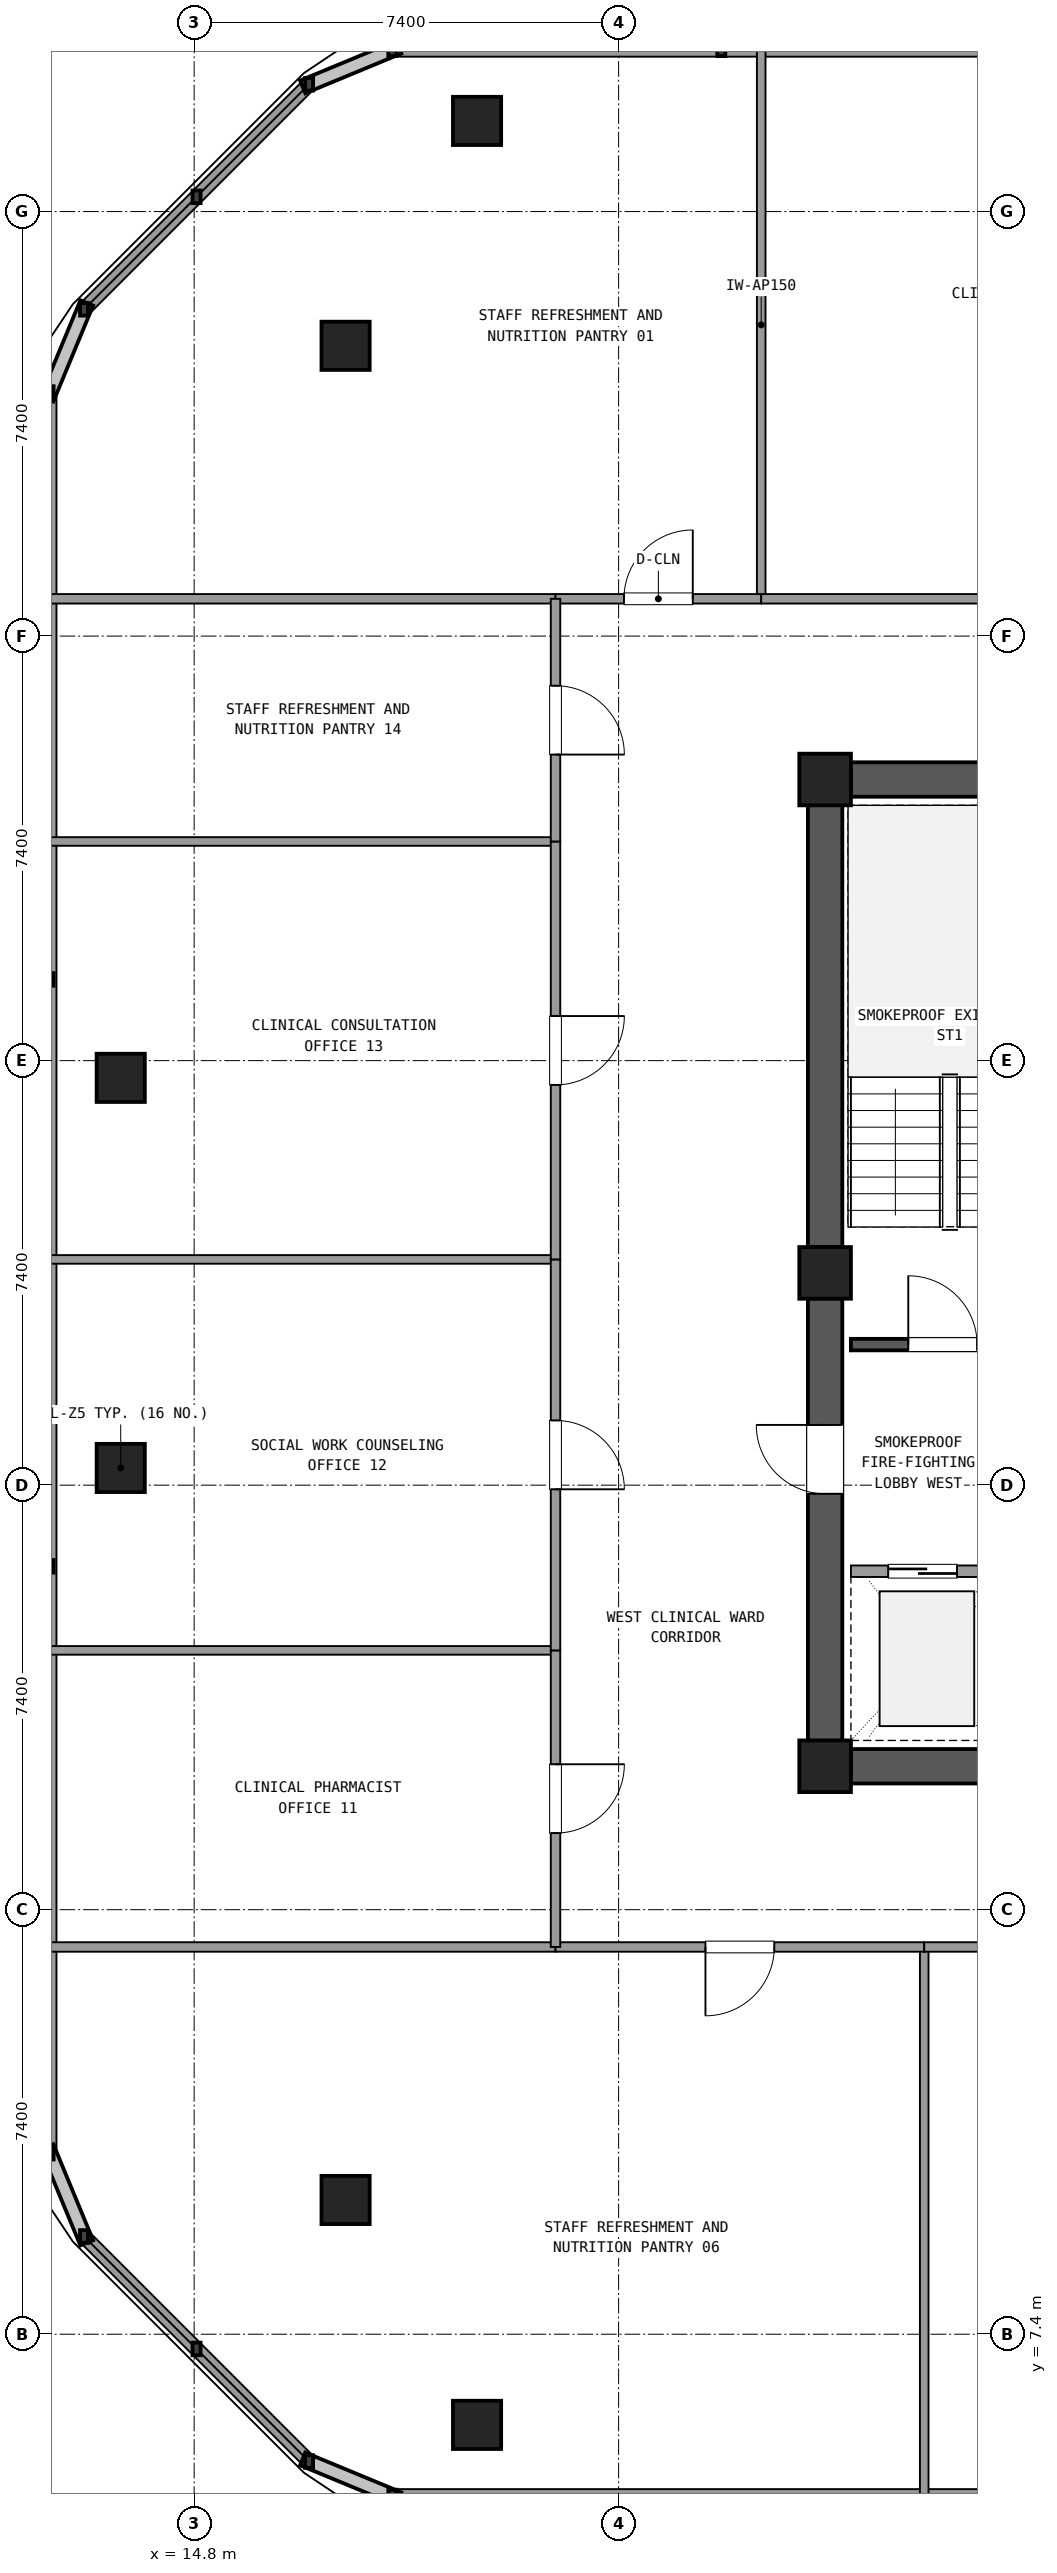
"""IFC4 building model, lengths in metres.
Left out: names, types, materials, properties, quantities, classifications, styles, units other than length and angle.
Written with IfcOpenShell. Run it as: python <this file> out.ifc"""

import sys

from ifc_helpers import new_model, si_unit, direction, frame, frame_2d, origin, origin_2d, place, context, subcontext, project, spatial, rectangle, extrude, element, fill, save


model = new_model("IFC4")
c1 = context("Model", 3, precision=1e-05, world=origin(), true_north=direction((0.0, 1.0)))
c2 = subcontext(c1, "Body", "Model", "MODEL_VIEW")
j1 = project(units=[si_unit("LENGTHUNIT", "METRE"), si_unit("PLANEANGLEUNIT", "RADIAN")], contexts=[c1])
p1 = place(None, origin())
s1 = spatial("IfcSite", under=j1, at=p1, CompositionType="ELEMENT")
p2 = place(p1, origin())
s2 = spatial("IfcBuilding", under=s1, at=p2, CompositionType="ELEMENT")
p3 = place(p2, frame((0.0, 0.0, 246.42)))
s3 = spatial("IfcBuildingStorey", under=s2, at=p3, CompositionType="ELEMENT", Elevation=246.42)
for number, where, z_axis, x_axis in (
    (1, (25.8, 17.3, 0.0), (0.0, 0.0, 1.0), (1.0, 0.0, 0.0)),
    (2, (25.8, 34.5, 0.0), (0.0, 0.0, 1.0), (1.0, 0.0, 0.0)),
    (3, (25.8, 25.9, 0.0), (0.0, 0.0, 1.0), (1.0, 0.0, 0.0)),
):
    element("IfcColumn", number, at=place(p3, frame(where, z_axis=z_axis, x_axis=x_axis)), inside=s3, PredefinedType="COLUMN", context=c2, shape_type="SweptSolid", body=[
        extrude(rectangle(XDim=0.9, YDim=0.9, at=origin_2d()), origin(), (0.0, 0.0, 1.0), 3.6),
    ])
p4 = place(p3, frame((26.245, 17.3, 0.0), z_axis=(0.0, 0.0, 1.0), x_axis=(1.0, 0.0, 0.0)))
e4 = element("IfcWall", 4, at=p4, inside=s3, PredefinedType="SHEAR", context=c2, shape_type="SweptSolid", body=[
    extrude(rectangle(XDim=10.31, YDim=0.6, at=frame_2d((5.155, 0.0))), origin(), (0.0, 0.0, 1.0), 3.32),
])
p5 = place(p3, frame((36.555, 34.5, 0.0), z_axis=(0.0, 0.0, 1.0), x_axis=(-1.0, 0.0, 0.0)))
e5 = element("IfcWall", 5, at=p5, inside=s3, PredefinedType="SHEAR", context=c2, shape_type="SweptSolid", body=[
    extrude(rectangle(XDim=10.31, YDim=0.6, at=frame_2d((5.155, 0.0))), origin(), (0.0, 0.0, 1.0), 3.32),
])
p6 = place(p5, frame((4.155, 0.0, 0.0)))
e6 = element("IfcOpeningElement", 6, at=p6, cuts=e5, PredefinedType="OPENING", context=c2, shape_type="SweptSolid", body=[
    extrude(rectangle(XDim=1.2, YDim=2.15, at=frame_2d((0.6, 1.075))), frame((0.0, 0.31, 0.0), z_axis=(0.0, -1.0, 0.0), x_axis=(1.0, 0.0, 0.0)), (0.0, 0.0, 1.0), 0.62),
])
p7 = place(p3, frame((25.8, 34.055, 0.0), z_axis=(0.0, 0.0, 1.0), x_axis=(0.0, -1.0, 0.0)))
e7 = element("IfcWall", 7, at=p7, inside=s3, PredefinedType="SHEAR", context=c2, shape_type="SweptSolid", body=[
    extrude(rectangle(XDim=7.71, YDim=0.6, at=frame_2d((3.855, 0.0))), origin(), (0.0, 0.0, 1.0), 3.32),
])
p8 = place(p3, frame((25.8, 25.455, 0.0), z_axis=(0.0, 0.0, 1.0), x_axis=(0.0, -1.0, 0.0)))
e8 = element("IfcWall", 8, at=p8, inside=s3, PredefinedType="SHEAR", context=c2, shape_type="SweptSolid", body=[
    extrude(rectangle(XDim=7.71, YDim=0.6, at=frame_2d((3.855, 0.0))), origin(), (0.0, 0.0, 1.0), 3.32),
])
p9 = place(p8, frame((2.205, 0.0, 0.0)))
e9 = element("IfcOpeningElement", 9, at=p9, cuts=e8, PredefinedType="OPENING", context=c2, shape_type="SweptSolid", body=[
    extrude(rectangle(XDim=1.2, YDim=2.15, at=frame_2d((0.6, 1.075))), frame((0.0, 0.31, 0.0), z_axis=(0.0, -1.0, 0.0), x_axis=(1.0, 0.0, 0.0)), (0.0, 0.0, 1.0), 0.62),
])
for number, where, z_axis, x_axis in (
    (10, (13.52, 22.5, 0.0), (0.0, 0.0, 1.0), (1.0, 0.0, 0.0)),
    (11, (17.44, 9.74, 0.0), (0.0, 0.0, 1.0), (1.0, 0.0, 0.0)),
    (12, (19.732, 5.82, 0.0), (0.0, 0.0, 1.0), (1.0, 0.0, 0.0)),
    (13, (19.732, 45.98, 0.0), (0.0, 0.0, 1.0), (1.0, 0.0, 0.0)),
    (14, (17.44, 42.06, 0.0), (0.0, 0.0, 1.0), (1.0, 0.0, 0.0)),
    (15, (13.52, 29.3, 0.0), (0.0, 0.0, 1.0), (1.0, 0.0, 0.0)),
):
    element("IfcColumn", number, at=place(p3, frame(where, z_axis=z_axis, x_axis=x_axis)), inside=s3, PredefinedType="COLUMN", context=c2, shape_type="SweptSolid", body=[
        extrude(rectangle(XDim=0.84, YDim=0.84, at=origin_2d()), origin(), (0.0, 0.0, 1.0), 3.6),
    ])
p10 = place(p3, frame((18.255, 4.58, 0.0), z_axis=(0.0, 0.0, 1.0), x_axis=(1.0, 0.0, 0.0)))
e16 = element("IfcWall", 16, at=p10, inside=s3, PredefinedType="SOLIDWALL", context=c2, shape_type="SweptSolid", body=[
    extrude(rectangle(XDim=37.49, YDim=0.24, at=frame_2d((18.745, 0.0))), origin(), (0.0, 0.0, 1.0), 0.85),
])
p11 = place(p3, frame((35.461, 47.22, 0.0), z_axis=(0.0, 0.0, 1.0), x_axis=(-1.0, 0.0, 0.0)))
e17 = element("IfcWall", 17, at=p11, inside=s3, PredefinedType="SOLIDWALL", context=c2, shape_type="SweptSolid", body=[
    extrude(rectangle(XDim=17.206, YDim=0.24, at=frame_2d((8.603, 0.0))), origin(), (0.0, 0.0, 1.0), 0.85),
])
p12 = place(p3, frame((16.804, 46.619, 0.0), z_axis=(0.0, 0.0, 1.0), x_axis=(-0.707106781187, -0.707106781187, 0.0)))
e18 = element("IfcWall", 18, at=p12, inside=s3, PredefinedType="SOLIDWALL", context=c2, shape_type="SweptSolid", body=[
    extrude(rectangle(XDim=5.548, YDim=0.24, at=frame_2d((2.774, 0.0))), origin(), (0.0, 0.0, 1.0), 0.85),
])
p13 = place(p3, frame((12.28, 41.245, 0.0), z_axis=(0.0, 0.0, 1.0), x_axis=(0.0, -1.0, 0.0)))
e19 = element("IfcWall", 19, at=p13, inside=s3, PredefinedType="SOLIDWALL", context=c2, shape_type="SweptSolid", body=[
    extrude(rectangle(XDim=30.69, YDim=0.24, at=frame_2d((15.345, 0.0))), origin(), (0.0, 0.0, 1.0), 0.85),
])
p14 = place(p3, frame((12.881, 9.104, 0.0), z_axis=(0.0, 0.0, 1.0), x_axis=(0.707084777957, -0.707128783731, 0.0)))
e20 = element("IfcWall", 20, at=p14, inside=s3, PredefinedType="SOLIDWALL", context=c2, shape_type="SweptSolid", body=[
    extrude(rectangle(XDim=5.548, YDim=0.24, at=frame_2d((2.774, 0.0))), origin(), (0.0, 0.0, 1.0), 0.85),
])
p15 = place(p3, frame((26.25, 24.65, 0.0), z_axis=(0.0, 0.0, 1.0), x_axis=(1.0, 0.0, 0.0)))
e21 = element("IfcWall", 21, at=p15, inside=s3, PredefinedType="SHEAR", context=c2, shape_type="SweptSolid", body=[
    extrude(rectangle(XDim=4.0, YDim=0.2, at=frame_2d((2.0, 0.0))), origin(), (0.0, 0.0, 1.0), 3.32),
])
p16 = place(p15, frame((1.0, 0.0, 0.0)))
e22 = element("IfcOpeningElement", 22, at=p16, cuts=e21, PredefinedType="OPENING", context=c2, shape_type="SweptSolid", body=[
    extrude(rectangle(XDim=1.2, YDim=2.15, at=frame_2d((0.6, 1.075))), frame((0.0, 0.11, 0.0), z_axis=(0.0, -1.0, 0.0), x_axis=(1.0, 0.0, 0.0)), (0.0, 0.0, 1.0), 0.22),
])
p17 = place(p3, frame((26.25, 20.7, 0.0), z_axis=(0.0, 0.0, 1.0), x_axis=(1.0, 0.0, 0.0)))
e23 = element("IfcWall", 23, at=p17, inside=s3, PredefinedType="SOLIDWALL", context=c2, shape_type="SweptSolid", body=[
    extrude(rectangle(XDim=4.0, YDim=0.2, at=frame_2d((2.0, 0.0))), origin(), (0.0, 0.0, 1.0), 2.61),
])
p18 = place(p17, frame((0.65, 0.0, 0.0)))
e24 = element("IfcOpeningElement", 24, at=p18, cuts=e23, PredefinedType="OPENING", context=c2, shape_type="SweptSolid", body=[
    extrude(rectangle(XDim=1.2, YDim=2.15, at=frame_2d((0.6, 1.075))), frame((0.0, 0.11, 0.0), z_axis=(0.0, -1.0, 0.0), x_axis=(1.0, 0.0, 0.0)), (0.0, 0.0, 1.0), 0.22),
])
for number, where, z_axis, x_axis in (
    (25, (12.3, 37.65, 0.0), (0.0, 0.0, 1.0), (1.0, 0.0, 0.0)),
    (26, (12.3, 14.15, 0.0), (0.0, 0.0, 1.0), (1.0, 0.0, 0.0)),
):
    element("IfcWall", number, at=place(p3, frame(where, z_axis=z_axis, x_axis=x_axis)), inside=s3, PredefinedType="PARTITIONING", context=c2, shape_type="SweptSolid", body=[
        extrude(rectangle(XDim=8.8, YDim=0.165, at=frame_2d((4.4, 0.0))), origin(), (0.0, 0.0, 1.0), 2.61),
    ])
p19 = place(p3, frame((24.686, 37.65, 0.0), z_axis=(0.0, 0.0, 1.0), x_axis=(0.0, 1.0, 0.0)))
e27 = element("IfcWall", 27, at=p19, inside=s3, PredefinedType="PARTITIONING", context=c2, shape_type="SweptSolid", body=[
    extrude(rectangle(XDim=9.55, YDim=0.15, at=frame_2d((4.775, 0.0))), origin(), (0.0, 0.0, 1.0), 2.61),
])
p20 = place(p3, frame((21.1, 37.65, 0.0), z_axis=(0.0, 0.0, 1.0), x_axis=(1.0, 0.0, 0.0)))
e28 = element("IfcWall", 28, at=p20, inside=s3, PredefinedType="PARTITIONING", context=c2, shape_type="SweptSolid", body=[
    extrude(rectangle(XDim=3.586, YDim=0.165, at=frame_2d((1.793, 0.0))), origin(), (0.0, 0.0, 1.0), 2.61),
])
p21 = place(p20, frame((1.193, 0.0, 0.0)))
e29 = element("IfcOpeningElement", 29, at=p21, cuts=e28, PredefinedType="OPENING", context=c2, shape_type="SweptSolid", body=[
    extrude(rectangle(XDim=1.2, YDim=2.15, at=frame_2d((0.6, 1.075))), frame((0.0, 0.093, 0.0), z_axis=(0.0, -1.0, 0.0), x_axis=(1.0, 0.0, 0.0)), (0.0, 0.0, 1.0), 0.185),
])
p22 = place(p3, frame((24.686, 37.65, 0.0), z_axis=(0.0, 0.0, 1.0), x_axis=(1.0, 0.0, 0.0)))
e30 = element("IfcWall", 30, at=p22, inside=s3, PredefinedType="PARTITIONING", context=c2, shape_type="SweptSolid", body=[
    extrude(rectangle(XDim=8.999, YDim=0.165, at=frame_2d((4.5, 0.0))), origin(), (0.0, 0.0, 1.0), 2.61),
])
p23 = place(p22, frame((3.9, 0.0, 0.0)))
e31 = element("IfcOpeningElement", 31, at=p23, cuts=e30, PredefinedType="OPENING", context=c2, shape_type="SweptSolid", body=[
    extrude(rectangle(XDim=1.2, YDim=2.15, at=frame_2d((0.6, 1.075))), frame((0.0, 0.093, 0.0), z_axis=(0.0, -1.0, 0.0), x_axis=(1.0, 0.0, 0.0)), (0.0, 0.0, 1.0), 0.185),
])
p24 = place(p3, frame((27.528, 14.15, 0.0), z_axis=(0.0, 0.0, 1.0), x_axis=(0.0, -1.0, 0.0)))
e32 = element("IfcWall", 32, at=p24, inside=s3, PredefinedType="PARTITIONING", context=c2, shape_type="SweptSolid", body=[
    extrude(rectangle(XDim=9.55, YDim=0.15, at=frame_2d((4.775, 0.0))), origin(), (0.0, 0.0, 1.0), 2.61),
])
p25 = place(p3, frame((21.1, 14.15, 0.0), z_axis=(0.0, 0.0, 1.0), x_axis=(1.0, 0.0, 0.0)))
e33 = element("IfcWall", 33, at=p25, inside=s3, PredefinedType="PARTITIONING", context=c2, shape_type="SweptSolid", body=[
    extrude(rectangle(XDim=6.428, YDim=0.165, at=frame_2d((3.214, 0.0))), origin(), (0.0, 0.0, 1.0), 2.61),
])
p26 = place(p25, frame((2.614, 0.0, 0.0)))
e34 = element("IfcOpeningElement", 34, at=p26, cuts=e33, PredefinedType="OPENING", context=c2, shape_type="SweptSolid", body=[
    extrude(rectangle(XDim=1.2, YDim=2.15, at=frame_2d((0.6, 1.075))), frame((0.0, 0.093, 0.0), z_axis=(0.0, -1.0, 0.0), x_axis=(1.0, 0.0, 0.0)), (0.0, 0.0, 1.0), 0.185),
])
p27 = place(p3, frame((27.528, 14.15, 0.0), z_axis=(0.0, 0.0, 1.0), x_axis=(1.0, 0.0, 0.0)))
e35 = element("IfcWall", 35, at=p27, inside=s3, PredefinedType="PARTITIONING", context=c2, shape_type="SweptSolid", body=[
    extrude(rectangle(XDim=10.163, YDim=0.165, at=frame_2d((5.082, 0.0))), origin(), (0.0, 0.0, 1.0), 2.61),
])
p28 = place(p27, frame((4.482, 0.0, 0.0)))
e36 = element("IfcOpeningElement", 36, at=p28, cuts=e35, PredefinedType="OPENING", context=c2, shape_type="SweptSolid", body=[
    extrude(rectangle(XDim=1.2, YDim=2.15, at=frame_2d((0.6, 1.075))), frame((0.0, 0.093, 0.0), z_axis=(0.0, -1.0, 0.0), x_axis=(1.0, 0.0, 0.0)), (0.0, 0.0, 1.0), 0.185),
])
p29 = place(p3, frame((21.1, 19.32, 0.0), z_axis=(0.0, 0.0, 1.0), x_axis=(-1.0, 0.0, 0.0)))
e37 = element("IfcWall", 37, at=p29, inside=s3, PredefinedType="PARTITIONING", context=c2, shape_type="SweptSolid", body=[
    extrude(rectangle(XDim=8.8, YDim=0.15, at=frame_2d((4.4, 0.0))), origin(), (0.0, 0.0, 1.0), 2.61),
])
p30 = place(p3, frame((21.1, 14.15, 0.0), z_axis=(0.0, 0.0, 1.0), x_axis=(0.0, 1.0, 0.0)))
e38 = element("IfcWall", 38, at=p30, inside=s3, PredefinedType="PARTITIONING", context=c2, shape_type="SweptSolid", body=[
    extrude(rectangle(XDim=5.17, YDim=0.165, at=frame_2d((2.585, 0.0))), origin(), (0.0, 0.0, 1.0), 2.61),
])
p31 = place(p30, frame((1.985, 0.0, 0.0)))
e39 = element("IfcOpeningElement", 39, at=p31, cuts=e38, PredefinedType="OPENING", context=c2, shape_type="SweptSolid", body=[
    extrude(rectangle(XDim=1.2, YDim=2.15, at=frame_2d((0.6, 1.075))), frame((0.0, 0.093, 0.0), z_axis=(0.0, -1.0, 0.0), x_axis=(1.0, 0.0, 0.0)), (0.0, 0.0, 1.0), 0.185),
])
p32 = place(p3, frame((21.1, 26.135, 0.0), z_axis=(0.0, 0.0, 1.0), x_axis=(-1.0, 0.0, 0.0)))
e40 = element("IfcWall", 40, at=p32, inside=s3, PredefinedType="PARTITIONING", context=c2, shape_type="SweptSolid", body=[
    extrude(rectangle(XDim=8.8, YDim=0.15, at=frame_2d((4.4, 0.0))), origin(), (0.0, 0.0, 1.0), 2.61),
])
p33 = place(p3, frame((21.1, 19.32, 0.0), z_axis=(0.0, 0.0, 1.0), x_axis=(0.0, 1.0, 0.0)))
e41 = element("IfcWall", 41, at=p33, inside=s3, PredefinedType="PARTITIONING", context=c2, shape_type="SweptSolid", body=[
    extrude(rectangle(XDim=6.815, YDim=0.165, at=frame_2d((3.407, 0.0))), origin(), (0.0, 0.0, 1.0), 2.61),
])
p34 = place(p33, frame((2.808, 0.0, 0.0)))
e42 = element("IfcOpeningElement", 42, at=p34, cuts=e41, PredefinedType="OPENING", context=c2, shape_type="SweptSolid", body=[
    extrude(rectangle(XDim=1.2, YDim=2.15, at=frame_2d((0.6, 1.075))), frame((0.0, 0.093, 0.0), z_axis=(0.0, -1.0, 0.0), x_axis=(1.0, 0.0, 0.0)), (0.0, 0.0, 1.0), 0.185),
])
p35 = place(p3, frame((21.1, 33.42, 0.0), z_axis=(0.0, 0.0, 1.0), x_axis=(-1.0, 0.0, 0.0)))
e43 = element("IfcWall", 43, at=p35, inside=s3, PredefinedType="PARTITIONING", context=c2, shape_type="SweptSolid", body=[
    extrude(rectangle(XDim=8.8, YDim=0.15, at=frame_2d((4.4, 0.0))), origin(), (0.0, 0.0, 1.0), 2.61),
])
p36 = place(p3, frame((21.1, 26.135, 0.0), z_axis=(0.0, 0.0, 1.0), x_axis=(0.0, 1.0, 0.0)))
e44 = element("IfcWall", 44, at=p36, inside=s3, PredefinedType="PARTITIONING", context=c2, shape_type="SweptSolid", body=[
    extrude(rectangle(XDim=7.285, YDim=0.165, at=frame_2d((3.643, 0.0))), origin(), (0.0, 0.0, 1.0), 2.61),
])
p37 = place(p36, frame((3.042, 0.0, 0.0)))
e45 = element("IfcOpeningElement", 45, at=p37, cuts=e44, PredefinedType="OPENING", context=c2, shape_type="SweptSolid", body=[
    extrude(rectangle(XDim=1.2, YDim=2.15, at=frame_2d((0.6, 1.075))), frame((0.0, 0.093, 0.0), z_axis=(0.0, -1.0, 0.0), x_axis=(1.0, 0.0, 0.0)), (0.0, 0.0, 1.0), 0.185),
])
p38 = place(p3, frame((21.1, 33.42, 0.0), z_axis=(0.0, 0.0, 1.0), x_axis=(0.0, 1.0, 0.0)))
e46 = element("IfcWall", 46, at=p38, inside=s3, PredefinedType="PARTITIONING", context=c2, shape_type="SweptSolid", body=[
    extrude(rectangle(XDim=4.23, YDim=0.165, at=frame_2d((2.115, 0.0))), origin(), (0.0, 0.0, 1.0), 2.61),
])
p39 = place(p38, frame((1.515, 0.0, 0.0)))
e47 = element("IfcOpeningElement", 47, at=p39, cuts=e46, PredefinedType="OPENING", context=c2, shape_type="SweptSolid", body=[
    extrude(rectangle(XDim=1.2, YDim=2.15, at=frame_2d((0.6, 1.075))), frame((0.0, 0.093, 0.0), z_axis=(0.0, -1.0, 0.0), x_axis=(1.0, 0.0, 0.0)), (0.0, 0.0, 1.0), 0.185),
])
p40 = place(p16, origin())
e48 = element("IfcDoor", 48, at=p40, inside=s3, OperationType="SINGLE_SWING_LEFT", PredefinedType="DOOR", context=c2, shape_type="SweptSolid", body=[
    extrude(rectangle(XDim=1.2, YDim=2.15, at=frame_2d((0.6, 1.075))), frame((0.0, 0.025, 0.0), z_axis=(0.0, -1.0, 0.0), x_axis=(1.0, 0.0, 0.0)), (0.0, 0.0, 1.0), 0.05),
])
fill(e22, e48)
p41 = place(p18, origin())
e49 = element("IfcDoor", 49, at=p41, inside=s3, OperationType="SLIDING_TO_LEFT", PredefinedType="DOOR", context=c2, shape_type="SweptSolid", body=[
    extrude(rectangle(XDim=1.2, YDim=2.15, at=frame_2d((0.6, 1.075))), frame((0.0, 0.025, 0.0), z_axis=(0.0, -1.0, 0.0), x_axis=(1.0, 0.0, 0.0)), (0.0, 0.0, 1.0), 0.05),
])
fill(e24, e49)
p42 = place(p9, frame((1.2, 0.0, 0.0), z_axis=(0.0, 0.0, 1.0), x_axis=(-1.0, 0.0, 0.0)))
e50 = element("IfcDoor", 50, at=p42, inside=s3, OperationType="SINGLE_SWING_LEFT", PredefinedType="DOOR", context=c2, shape_type="SweptSolid", body=[
    extrude(rectangle(XDim=1.2, YDim=2.15, at=frame_2d((0.6, 1.075))), frame((0.0, 0.025, 0.0), z_axis=(0.0, -1.0, 0.0), x_axis=(1.0, 0.0, 0.0)), (0.0, 0.0, 1.0), 0.05),
])
fill(e9, e50)
p43 = place(p21, origin())
e51 = element("IfcDoor", 51, at=p43, inside=s3, OperationType="SINGLE_SWING_RIGHT", PredefinedType="DOOR", context=c2, shape_type="SweptSolid", body=[
    extrude(rectangle(XDim=1.2, YDim=2.15, at=frame_2d((0.6, 1.075))), frame((0.0, 0.025, 0.0), z_axis=(0.0, -1.0, 0.0), x_axis=(1.0, 0.0, 0.0)), (0.0, 0.0, 1.0), 0.05),
])
fill(e29, e51)
p44 = place(p26, frame((1.2, 0.0, 0.0), z_axis=(0.0, 0.0, 1.0), x_axis=(-1.0, 0.0, 0.0)))
e52 = element("IfcDoor", 52, at=p44, inside=s3, OperationType="SINGLE_SWING_LEFT", PredefinedType="DOOR", context=c2, shape_type="SweptSolid", body=[
    extrude(rectangle(XDim=1.2, YDim=2.15, at=frame_2d((0.6, 1.075))), frame((0.0, 0.025, 0.0), z_axis=(0.0, -1.0, 0.0), x_axis=(1.0, 0.0, 0.0)), (0.0, 0.0, 1.0), 0.05),
])
fill(e34, e52)
p45 = place(p31, frame((1.2, 0.0, 0.0), z_axis=(0.0, 0.0, 1.0), x_axis=(-1.0, 0.0, 0.0)))
e53 = element("IfcDoor", 53, at=p45, inside=s3, OperationType="SINGLE_SWING_RIGHT", PredefinedType="DOOR", context=c2, shape_type="SweptSolid", body=[
    extrude(rectangle(XDim=1.2, YDim=2.15, at=frame_2d((0.6, 1.075))), frame((0.0, 0.025, 0.0), z_axis=(0.0, -1.0, 0.0), x_axis=(1.0, 0.0, 0.0)), (0.0, 0.0, 1.0), 0.05),
])
fill(e39, e53)
p46 = place(p34, frame((1.2, 0.0, 0.0), z_axis=(0.0, 0.0, 1.0), x_axis=(-1.0, 0.0, 0.0)))
e54 = element("IfcDoor", 54, at=p46, inside=s3, OperationType="SINGLE_SWING_LEFT", PredefinedType="DOOR", context=c2, shape_type="SweptSolid", body=[
    extrude(rectangle(XDim=1.2, YDim=2.15, at=frame_2d((0.6, 1.075))), frame((0.0, 0.025, 0.0), z_axis=(0.0, -1.0, 0.0), x_axis=(1.0, 0.0, 0.0)), (0.0, 0.0, 1.0), 0.05),
])
fill(e42, e54)
p47 = place(p37, frame((1.2, 0.0, 0.0), z_axis=(0.0, 0.0, 1.0), x_axis=(-1.0, 0.0, 0.0)))
e55 = element("IfcDoor", 55, at=p47, inside=s3, OperationType="SINGLE_SWING_RIGHT", PredefinedType="DOOR", context=c2, shape_type="SweptSolid", body=[
    extrude(rectangle(XDim=1.2, YDim=2.15, at=frame_2d((0.6, 1.075))), frame((0.0, 0.025, 0.0), z_axis=(0.0, -1.0, 0.0), x_axis=(1.0, 0.0, 0.0)), (0.0, 0.0, 1.0), 0.05),
])
fill(e45, e55)
p48 = place(p39, frame((1.2, 0.0, 0.0), z_axis=(0.0, 0.0, 1.0), x_axis=(-1.0, 0.0, 0.0)))
e56 = element("IfcDoor", 56, at=p48, inside=s3, OperationType="SINGLE_SWING_LEFT", PredefinedType="DOOR", context=c2, shape_type="SweptSolid", body=[
    extrude(rectangle(XDim=1.2, YDim=2.15, at=frame_2d((0.6, 1.075))), frame((0.0, 0.025, 0.0), z_axis=(0.0, -1.0, 0.0), x_axis=(1.0, 0.0, 0.0)), (0.0, 0.0, 1.0), 0.05),
])
fill(e47, e56)
save(model, sys.argv[1])
